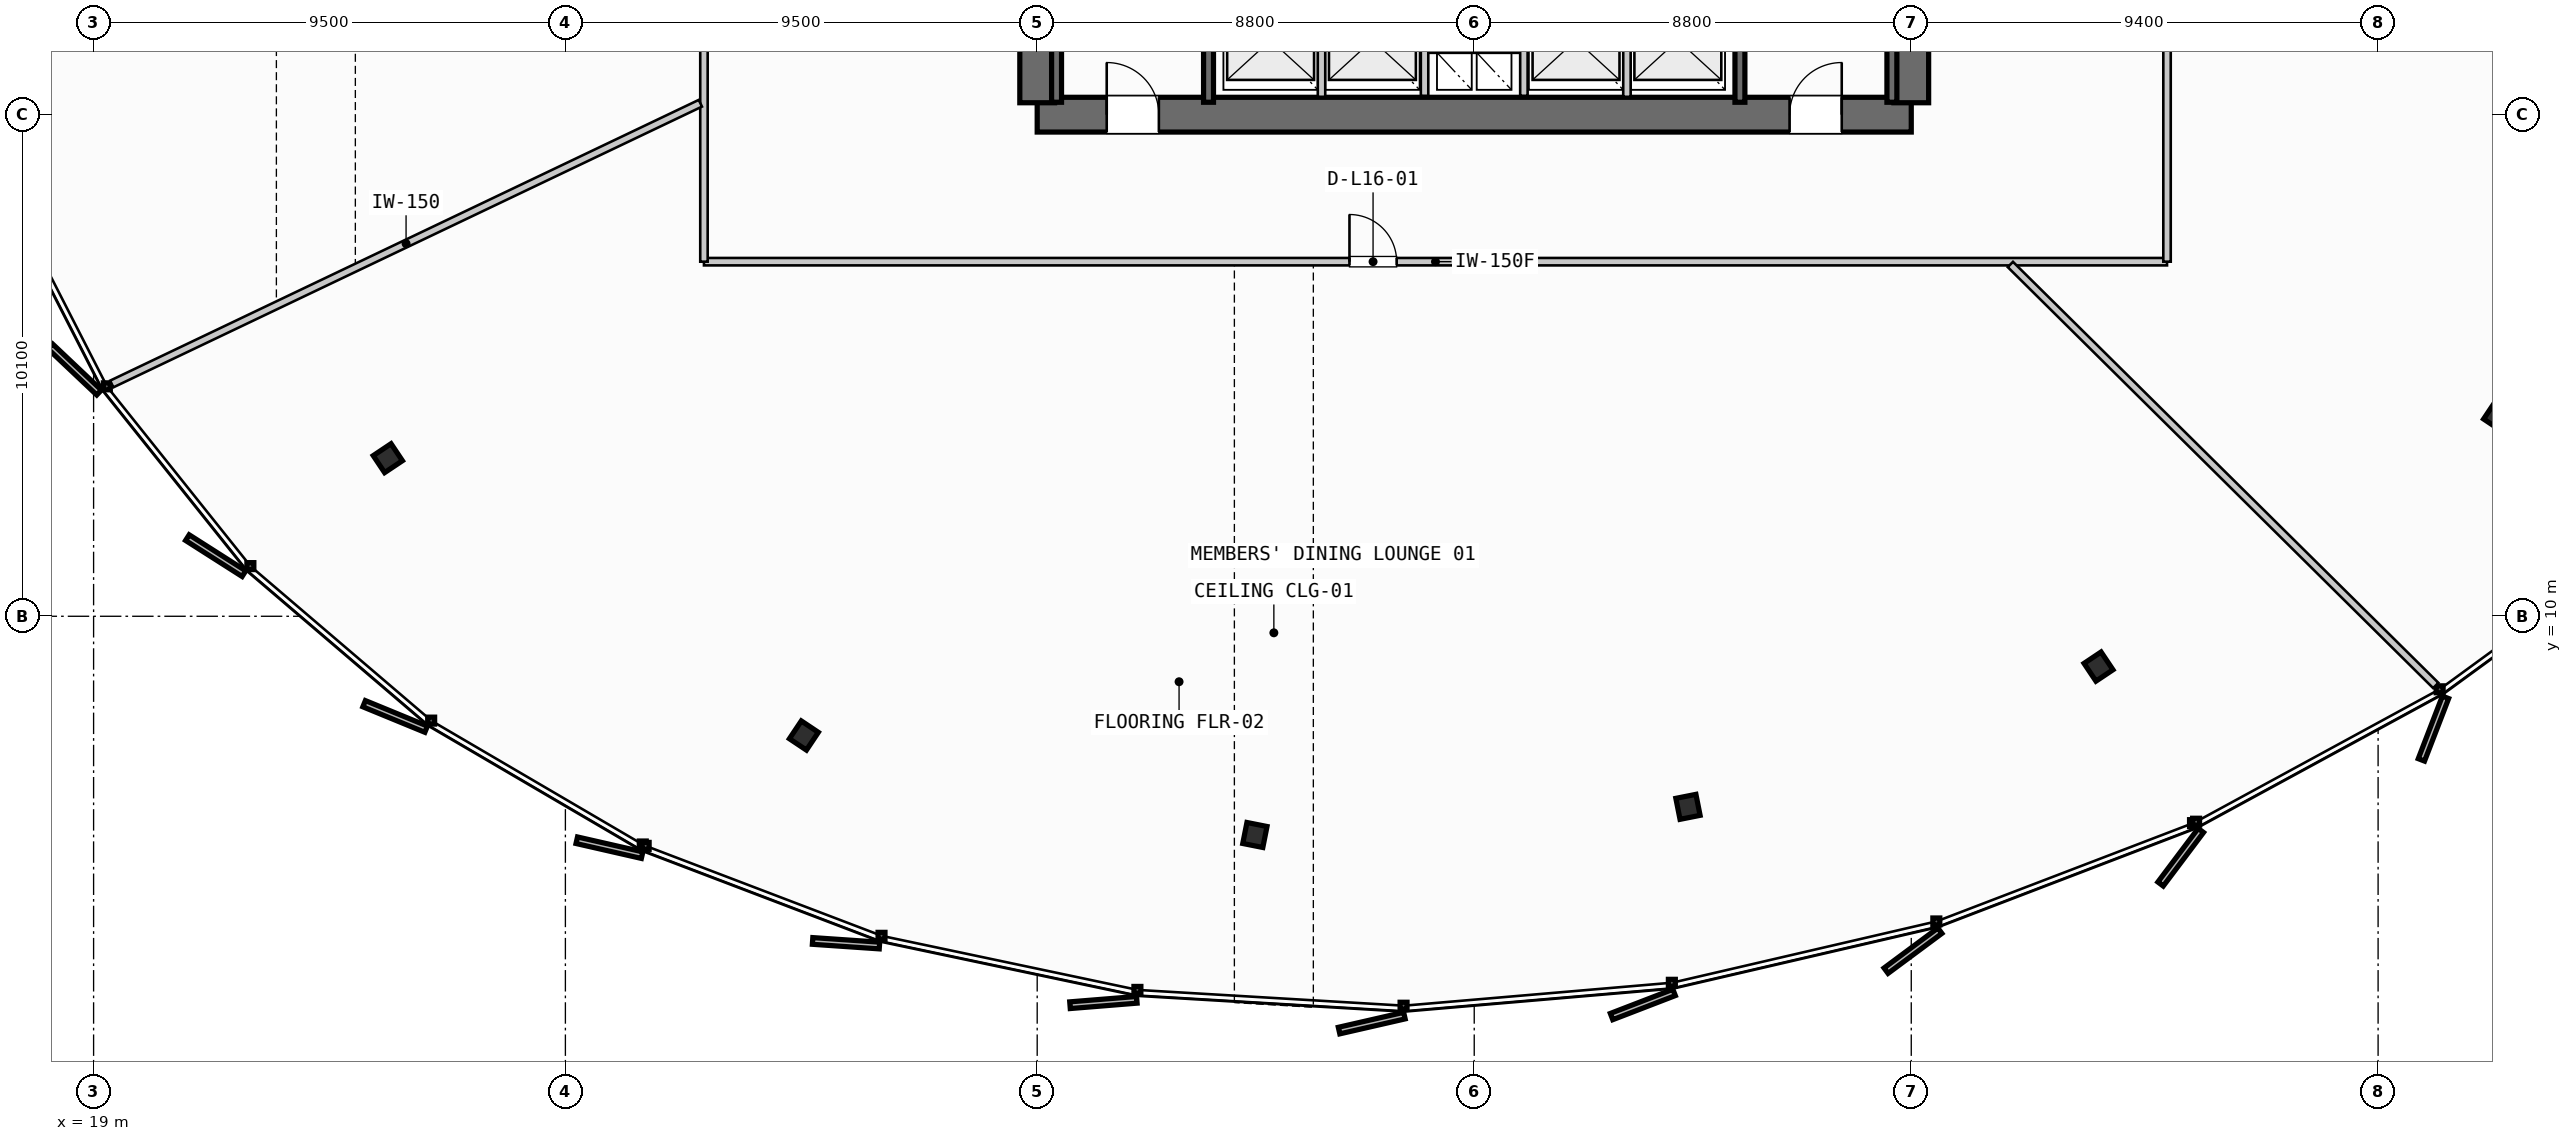
"""IFC4 building model, lengths in metres.
Left out: names, types, materials, properties, quantities, classifications, styles, units other than length and angle.
Written with IfcOpenShell. Run it as: python <this file> out.ifc"""

import sys

from ifc_helpers import new_model, si_unit, direction, frame, frame_2d, origin, origin_2d, place, context, subcontext, project, spatial, rectangle, i_section, extrude, source, transform, mapped, element, fill, save


model = new_model("IFC4")
c1 = context("Model", 3, precision=1e-05, world=origin(), true_north=direction((0.0, 1.0)))
c2 = subcontext(c1, "Body", "Model", "MODEL_VIEW")
j1 = project(units=[si_unit("LENGTHUNIT", "METRE"), si_unit("PLANEANGLEUNIT", "RADIAN")], contexts=[c1])
p1 = place(None, origin())
s1 = spatial("IfcSite", under=j1, at=p1, CompositionType="ELEMENT")
p2 = place(p1, origin())
s2 = spatial("IfcBuilding", under=s1, at=p2, CompositionType="ELEMENT")
p3 = place(p2, frame((0.0, 0.0, 67.6)))
s3 = spatial("IfcBuildingStorey", under=s2, at=p3, CompositionType="ELEMENT", Elevation=67.6)
p4 = place(p3, frame((38.0, 20.1, 0.0), z_axis=(0.0, 0.0, 1.0), x_axis=(1.0, 0.0, 0.0)))
e1 = element("IfcWall", 1, at=p4, inside=s3, PredefinedType="SHEAR", context=c2, shape_type="SweptSolid", body=[
    extrude(rectangle(XDim=17.6, YDim=0.7, at=frame_2d((8.8, 0.0))), origin(), (0.0, 0.0, 1.0), 3.55),
])
p5 = place(p4, frame((1.4, 0.0, 0.0)))
e2 = element("IfcOpeningElement", 2, at=p5, cuts=e1, PredefinedType="OPENING", context=c2, shape_type="SweptSolid", body=[
    extrude(rectangle(XDim=1.05, YDim=2.15, at=frame_2d((0.525, 1.075))), frame((0.0, 0.36, 0.0), z_axis=(0.0, -1.0, 0.0), x_axis=(1.0, 0.0, 0.0)), (0.0, 0.0, 1.0), 0.72),
])
p6 = place(p4, frame((15.15, 0.0, 0.0)))
e3 = element("IfcOpeningElement", 3, at=p6, cuts=e1, PredefinedType="OPENING", context=c2, shape_type="SweptSolid", body=[
    extrude(rectangle(XDim=1.05, YDim=2.15, at=frame_2d((0.525, 1.075))), frame((0.0, 0.36, 0.0), z_axis=(0.0, -1.0, 0.0), x_axis=(1.0, 0.0, 0.0)), (0.0, 0.0, 1.0), 0.72),
])
p7 = place(p3, frame((38.0, 35.26, 0.0), z_axis=(0.0, 0.0, 1.0), x_axis=(0.0, -1.0, 0.0)))
e4 = element("IfcWall", 4, at=p7, inside=s3, PredefinedType="SHEAR", context=c2, shape_type="SweptSolid", body=[
    extrude(rectangle(XDim=14.92, YDim=0.7, at=frame_2d((7.46, 0.0))), origin(), (0.0, 0.0, 1.0), 3.55),
])
p8 = place(p7, frame((5.21, 0.0, 0.0)))
e5 = element("IfcOpeningElement", 5, at=p8, cuts=e4, PredefinedType="OPENING", context=c2, shape_type="SweptSolid", body=[
    extrude(rectangle(XDim=1.1, YDim=2.2, at=frame_2d((0.55, 1.1))), frame((0.0, 0.36, 0.0), z_axis=(0.0, -1.0, 0.0), x_axis=(1.0, 0.0, 0.0)), (0.0, 0.0, 1.0), 0.72),
])
p9 = place(p3, frame((55.6, 20.34, 0.0), z_axis=(0.0, 0.0, 1.0), x_axis=(0.0, 1.0, 0.0)))
e6 = element("IfcWall", 6, at=p9, inside=s3, PredefinedType="SHEAR", context=c2, shape_type="SweptSolid", body=[
    extrude(rectangle(XDim=14.92, YDim=0.7, at=frame_2d((7.46, 0.0))), origin(), (0.0, 0.0, 1.0), 3.55),
])
p10 = place(p9, frame((12.71, 0.0, 0.0)))
e7 = element("IfcOpeningElement", 7, at=p10, cuts=e6, PredefinedType="OPENING", context=c2, shape_type="SweptSolid", body=[
    extrude(rectangle(XDim=1.05, YDim=2.15, at=frame_2d((0.525, 1.075))), frame((0.0, 0.36, 0.0), z_axis=(0.0, -1.0, 0.0), x_axis=(1.0, 0.0, 0.0)), (0.0, 0.0, 1.0), 0.72),
])
p11 = place(p9, frame((8.61, 0.0, 0.0)))
e8 = element("IfcOpeningElement", 8, at=p11, cuts=e6, PredefinedType="OPENING", context=c2, shape_type="SweptSolid", body=[
    extrude(rectangle(XDim=1.1, YDim=2.2, at=frame_2d((0.55, 1.1))), frame((0.0, 0.36, 0.0), z_axis=(0.0, -1.0, 0.0), x_axis=(1.0, 0.0, 0.0)), (0.0, 0.0, 1.0), 0.72),
])
m1 = source(origin(), c2, "Body", "SweptSolid", [
    extrude(i_section(OverallWidth=0.412, OverallDepth=0.431, WebThickness=0.042, FlangeThickness=0.068, FilletRadius=0.015, at=origin_2d()), origin(), (0.0, 0.0, 1.0), 3.55),
])
for number, where, z_axis, x_axis in (
    (9, (24.925, 13.183, 0.0), (0.0, 0.0, 1.0), (-0.831, -0.556, 0.0)),
    (10, (33.302, 7.599, 0.0), (0.0, 0.0, 1.0), (-0.556, -0.831, 0.0)),
    (11, (42.383, 5.596, 0.0), (0.0, 0.0, 1.0), (-0.195, -0.981, 0.0)),
    (12, (51.104, 6.163, 0.0), (0.0, 0.0, 1.0), (0.195, -0.981, 0.0)),
    (13, (59.37, 8.987, 0.0), (0.0, 0.0, 1.0), (0.556, -0.831, 0.0)),
    (14, (67.418, 14.023, 0.0), (0.0, 0.0, 1.0), (0.831, -0.556, 0.0)),
):
    element("IfcColumn", number, at=place(p3, frame(where, z_axis=z_axis, x_axis=x_axis)), inside=s3, PredefinedType="COLUMN", context=c2, shape_type="MappedRepresentation", body=[
        mapped(m1, transform((0.0, 0.0, 0.0), scale=1.0)),
    ])
for number, where, z_axis, x_axis in (
    (15, (41.45, 27.7, 0.0), (0.0, 0.0, 1.0), (0.0, -1.0, 0.0)),
    (16, (38.39, 20.35, 0.0), (0.0, 0.0, 1.0), (0.0, 1.0, 0.0)),
    (17, (55.21, 27.7, 0.0), (0.0, 0.0, 1.0), (0.0, -1.0, 0.0)),
    (18, (52.15, 20.35, 0.0), (0.0, 0.0, 1.0), (0.0, 1.0, 0.0)),
):
    element("IfcWall", number, at=place(p3, frame(where, z_axis=z_axis, x_axis=x_axis)), inside=s3, PredefinedType="SHEAR", context=c2, shape_type="SweptSolid", body=[
        extrude(rectangle(XDim=7.35, YDim=0.2, at=frame_2d((3.675, 0.0))), origin(), (0.0, 0.0, 1.0), 3.55),
    ])
p12 = place(p3, frame((45.8, 21.42, 0.0), z_axis=(0.0, 0.0, 1.0), x_axis=(1.0, 0.0, 0.0)))
e19 = element("IfcWall", 19, at=p12, inside=s3, PredefinedType="PARTITIONING", context=c2, shape_type="SweptSolid", body=[
    extrude(rectangle(XDim=2.0, YDim=0.15, at=frame_2d((1.0, 0.0))), origin(), (0.0, 0.0, 1.0), 2.505),
])
for number, where, z_axis, x_axis in (
    (20, (45.8, 20.48, 0.0), (0.0, 0.0, 1.0), (0.0, 1.0, 0.0)),
    (21, (47.8, 20.48, 0.0), (0.0, 0.0, 1.0), (0.0, 1.0, 0.0)),
):
    element("IfcWall", number, at=place(p3, frame(where, z_axis=z_axis, x_axis=x_axis)), inside=s3, PredefinedType="PARTITIONING", context=c2, shape_type="SweptSolid", body=[
        extrude(rectangle(XDim=2.24, YDim=0.15, at=frame_2d((1.12, 0.0))), origin(), (0.0, 0.0, 1.0), 2.505),
    ])
for number, where, z_axis, x_axis in (
    (22, (43.725, 20.46, 0.0), (0.0, 0.0, 1.0), (0.0, 1.0, 0.0)),
    (23, (49.875, 20.46, 0.0), (0.0, 0.0, 1.0), (0.0, 1.0, 0.0)),
):
    element("IfcWall", number, at=place(p3, frame(where, z_axis=z_axis, x_axis=x_axis)), inside=s3, PredefinedType="PARTITIONING", context=c2, shape_type="SweptSolid", body=[
        extrude(rectangle(XDim=2.27, YDim=0.15, at=frame_2d((1.135, 0.0))), origin(), (0.0, 0.0, 1.0), 2.505),
    ])
p13 = place(p3, frame((31.29, 17.14, 0.0), z_axis=(0.0, 0.0, 1.0), x_axis=(1.0, 0.0, 0.0)))
e24 = element("IfcWall", 24, at=p13, inside=s3, PredefinedType="PARTITIONING", context=c2, shape_type="SweptSolid", body=[
    extrude(rectangle(XDim=29.46, YDim=0.15, at=frame_2d((14.73, 0.0))), origin(), (0.0, 0.0, 1.0), 2.505),
])
p14 = place(p13, frame((12.998, 0.0, 0.0)))
e25 = element("IfcOpeningElement", 25, at=p14, cuts=e24, PredefinedType="OPENING", context=c2, shape_type="SweptSolid", body=[
    extrude(rectangle(XDim=0.95, YDim=2.15, at=frame_2d((0.475, 1.075))), frame((0.0, 0.085, 0.0), z_axis=(0.0, -1.0, 0.0), x_axis=(1.0, 0.0, 0.0)), (0.0, 0.0, 1.0), 0.17),
])
p15 = place(p3, frame((60.75, 17.14, 0.0), z_axis=(0.0, 0.0, 1.0), x_axis=(0.0, 1.0, 0.0)))
e26 = element("IfcWall", 26, at=p15, inside=s3, PredefinedType="PARTITIONING", context=c2, shape_type="SweptSolid", body=[
    extrude(rectangle(XDim=21.32, YDim=0.15, at=frame_2d((10.66, 0.0))), origin(), (0.0, 0.0, 1.0), 2.505),
])
p16 = place(p15, frame((10.185, 0.0, 0.0)))
e27 = element("IfcOpeningElement", 27, at=p16, cuts=e26, PredefinedType="OPENING", context=c2, shape_type="SweptSolid", body=[
    extrude(rectangle(XDim=0.95, YDim=2.15, at=frame_2d((0.475, 1.075))), frame((0.0, 0.085, 0.0), z_axis=(0.0, -1.0, 0.0), x_axis=(1.0, 0.0, 0.0)), (0.0, 0.0, 1.0), 0.17),
])
p17 = place(p3, frame((31.29, 38.46, 0.0), z_axis=(0.0, 0.0, 1.0), x_axis=(0.0, -1.0, 0.0)))
e28 = element("IfcWall", 28, at=p17, inside=s3, PredefinedType="PARTITIONING", context=c2, shape_type="SweptSolid", body=[
    extrude(rectangle(XDim=21.32, YDim=0.15, at=frame_2d((10.66, 0.0))), origin(), (0.0, 0.0, 1.0), 2.505),
])
p18 = place(p17, frame((10.2, 0.0, 0.0)))
e29 = element("IfcOpeningElement", 29, at=p18, cuts=e28, PredefinedType="OPENING", context=c2, shape_type="SweptSolid", body=[
    extrude(rectangle(XDim=0.95, YDim=2.15, at=frame_2d((0.475, 1.075))), frame((0.0, 0.085, 0.0), z_axis=(0.0, -1.0, 0.0), x_axis=(1.0, 0.0, 0.0)), (0.0, 0.0, 1.0), 0.17),
])
p19 = place(p3, frame((31.218, 20.33, 0.0), z_axis=(0.0, 0.0, 1.0), x_axis=(-0.902605348343, -0.430469029248, 0.0)))
e30 = element("IfcWall", 30, at=p19, inside=s3, PredefinedType="PARTITIONING", context=c2, shape_type="SweptSolid", body=[
    extrude(rectangle(XDim=13.131, YDim=0.15, at=frame_2d((6.565, 0.0))), origin(), (0.0, 0.0, 1.0), 2.505),
])
p20 = place(p3, frame((57.595, 17.084, 0.0), z_axis=(0.0, 0.0, 1.0), x_axis=(0.710794315571, -0.703399915377, 0.0)))
e31 = element("IfcWall", 31, at=p20, inside=s3, PredefinedType="PARTITIONING", context=c2, shape_type="SweptSolid", body=[
    extrude(rectangle(XDim=12.051, YDim=0.15, at=frame_2d((6.026, 0.0))), origin(), (0.0, 0.0, 1.0), 2.505),
])
m2 = source(origin(), c2, "Body", "SweptSolid", [
    extrude(rectangle(XDim=1.05, YDim=2.15, at=frame_2d((0.525, 1.075))), frame((0.0, 0.025, 0.0), z_axis=(0.0, -1.0, 0.0), x_axis=(1.0, 0.0, 0.0)), (0.0, 0.0, 1.0), 0.05),
])
p21 = place(p5, origin())
e32 = element("IfcDoor", 32, at=p21, inside=s3, OperationType="SINGLE_SWING_LEFT", PredefinedType="DOOR", context=c2, shape_type="MappedRepresentation", body=[
    mapped(m2, transform((0.0, 0.0, 0.0), scale=1.0)),
])
fill(e2, e32)
p22 = place(p6, origin())
e33 = element("IfcDoor", 33, at=p22, inside=s3, OperationType="SINGLE_SWING_RIGHT", PredefinedType="DOOR", context=c2, shape_type="MappedRepresentation", body=[
    mapped(m2, transform((0.0, 0.0, 0.0), scale=1.0)),
])
fill(e3, e33)
m3 = source(origin(), c2, "Body", "SweptSolid", [
    extrude(rectangle(XDim=0.95, YDim=2.15, at=frame_2d((0.475, 1.075))), frame((0.0, 0.025, 0.0), z_axis=(0.0, -1.0, 0.0), x_axis=(1.0, 0.0, 0.0)), (0.0, 0.0, 1.0), 0.05),
])
p23 = place(p14, origin())
e34 = element("IfcDoor", 34, at=p23, inside=s3, OperationType="SINGLE_SWING_LEFT", PredefinedType="DOOR", context=c2, shape_type="MappedRepresentation", body=[
    mapped(m3, transform((0.0, 0.0, 0.0), scale=1.0)),
])
fill(e25, e34)
save(model, sys.argv[1])
